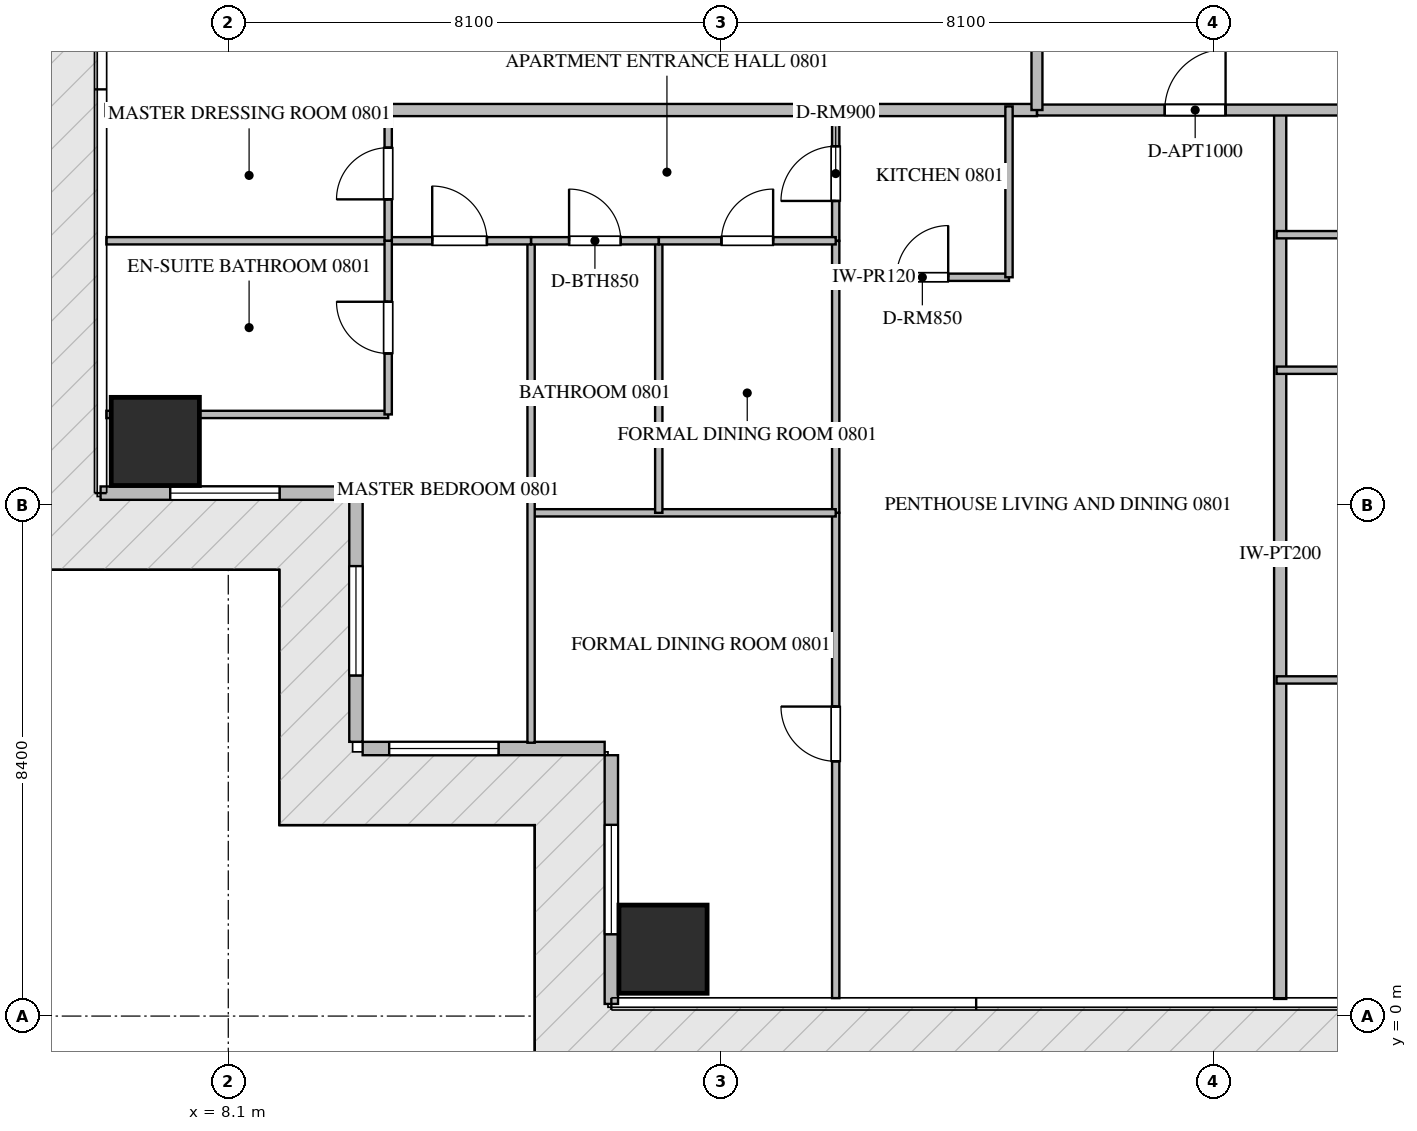
"""IFC4 building model, lengths in metres.
Left out: names, types, materials, properties, quantities, classifications, styles, units other than length and angle.
Written with IfcOpenShell. Run it as: python <this file> out.ifc"""

import sys

from ifc_helpers import new_model, si_unit, direction, frame, frame_2d, origin, origin_2d, place, context, subcontext, project, spatial, rectangle, extrude, source, transform, mapped, element, fill, save


model = new_model("IFC4")
c1 = context("Model", 3, precision=1e-05, world=origin(), true_north=direction((0.0, 1.0)))
c2 = subcontext(c1, "Body", "Model", "MODEL_VIEW")
j1 = project(units=[si_unit("LENGTHUNIT", "METRE"), si_unit("PLANEANGLEUNIT", "RADIAN")], contexts=[c1])
p1 = place(None, origin())
s1 = spatial("IfcSite", under=j1, at=p1, CompositionType="ELEMENT")
p2 = place(p1, origin())
s2 = spatial("IfcBuilding", under=s1, at=p2, CompositionType="ELEMENT")
p3 = place(p2, frame((0.0, 0.0, 37.95)))
s3 = spatial("IfcBuildingStorey", under=s2, at=p3, CompositionType="ELEMENT", Elevation=37.95)
m1 = source(origin(), c2, "Body", "SweptSolid", [
    extrude(rectangle(XDim=1.45, YDim=1.45, at=origin_2d()), origin(), (0.0, 0.0, 1.0), 3.75),
])
for number, where, z_axis, x_axis in (
    (1, (15.25, 1.1, -0.26), (0.0, 0.0, 1.0), (1.0, 0.0, 0.0)),
    (2, (6.9, 9.45, -0.26), (0.0, 0.0, 1.0), (1.0, 0.0, 0.0)),
):
    element("IfcColumn", number, at=place(p3, frame(where, z_axis=z_axis, x_axis=x_axis)), inside=s3, PredefinedType="COLUMN", context=c2, shape_type="MappedRepresentation", body=[
        mapped(m1, transform((0.0, 0.0, 0.0), scale=1.0)),
    ])
p4 = place(p3, frame((6.0, 8.6, 0.0), z_axis=(0.0, 0.0, 1.0), x_axis=(1.0, 0.0, 0.0)))
e3 = element("IfcWall", 3, at=p4, inside=s3, PredefinedType="ELEMENTEDWALL", context=c2, shape_type="SweptSolid", body=[
    extrude(rectangle(XDim=4.09, YDim=0.22, at=frame_2d((2.045, 0.0))), origin(), (0.0, 0.0, 1.0), 3.475),
])
p5 = place(p4, frame((1.145, 0.0, 0.65)))
e4 = element("IfcOpeningElement", 4, at=p5, cuts=e3, PredefinedType="OPENING", context=c2, shape_type="SweptSolid", body=[
    extrude(rectangle(XDim=1.8, YDim=2.1, at=frame_2d((0.9, 1.05))), frame((0.0, 0.12, 0.0), z_axis=(0.0, -1.0, 0.0), x_axis=(1.0, 0.0, 0.0)), (0.0, 0.0, 1.0), 0.24),
])
p6 = place(p3, frame((10.2, 8.49, 0.0), z_axis=(0.0, 0.0, 1.0), x_axis=(0.0, -1.0, 0.0)))
e5 = element("IfcWall", 5, at=p6, inside=s3, PredefinedType="ELEMENTEDWALL", context=c2, shape_type="SweptSolid", body=[
    extrude(rectangle(XDim=3.98, YDim=0.22, at=frame_2d((1.99, 0.0))), origin(), (0.0, 0.0, 1.0), 3.475),
])
p7 = place(p6, frame((1.09, 0.0, 0.65)))
e6 = element("IfcOpeningElement", 6, at=p7, cuts=e5, PredefinedType="OPENING", context=c2, shape_type="SweptSolid", body=[
    extrude(rectangle(XDim=1.8, YDim=2.1, at=frame_2d((0.9, 1.05))), frame((0.0, 0.12, 0.0), z_axis=(0.0, -1.0, 0.0), x_axis=(1.0, 0.0, 0.0)), (0.0, 0.0, 1.0), 0.24),
])
p8 = place(p3, frame((10.31, 4.4, 0.0), z_axis=(0.0, 0.0, 1.0), x_axis=(1.0, 0.0, 0.0)))
e7 = element("IfcWall", 7, at=p8, inside=s3, PredefinedType="ELEMENTEDWALL", context=c2, shape_type="SweptSolid", body=[
    extrude(rectangle(XDim=3.98, YDim=0.22, at=frame_2d((1.99, 0.0))), origin(), (0.0, 0.0, 1.0), 3.475),
])
p9 = place(p8, frame((0.436, 0.0, 0.65)))
e8 = element("IfcOpeningElement", 8, at=p9, cuts=e7, PredefinedType="OPENING", context=c2, shape_type="SweptSolid", body=[
    extrude(rectangle(XDim=1.8, YDim=2.1, at=frame_2d((0.9, 1.05))), frame((0.0, 0.12, 0.0), z_axis=(0.0, -1.0, 0.0), x_axis=(1.0, 0.0, 0.0)), (0.0, 0.0, 1.0), 0.24),
])
p10 = place(p3, frame((14.4, 4.29, 0.0), z_axis=(0.0, 0.0, 1.0), x_axis=(0.0, -1.0, 0.0)))
e9 = element("IfcWall", 9, at=p10, inside=s3, PredefinedType="ELEMENTEDWALL", context=c2, shape_type="SweptSolid", body=[
    extrude(rectangle(XDim=4.09, YDim=0.22, at=frame_2d((2.045, 0.0))), origin(), (0.0, 0.0, 1.0), 3.475),
])
p11 = place(p10, frame((1.145, 0.0, 0.65)))
e10 = element("IfcOpeningElement", 10, at=p11, cuts=e9, PredefinedType="OPENING", context=c2, shape_type="SweptSolid", body=[
    extrude(rectangle(XDim=1.8, YDim=2.1, at=frame_2d((0.9, 1.05))), frame((0.0, 0.12, 0.0), z_axis=(0.0, -1.0, 0.0), x_axis=(1.0, 0.0, 0.0)), (0.0, 0.0, 1.0), 0.24),
])
p12 = place(p3, frame((25.4, 0.282, 0.0), z_axis=(0.0, 0.0, 1.0), x_axis=(0.0, 1.0, 0.0)))
e11 = element("IfcWall", 11, at=p12, inside=s3, PredefinedType="PARTITIONING", context=c2, shape_type="SweptSolid", body=[
    extrude(rectangle(XDim=14.618, YDim=0.2, at=frame_2d((7.309, 0.0))), origin(), (0.0, 0.0, 1.0), 3.49),
])
p13 = place(p3, frame((6.082, 14.9, 0.0), z_axis=(0.0, 0.0, 1.0), x_axis=(1.0, 0.0, 0.0)))
e12 = element("IfcWall", 12, at=p13, inside=s3, PredefinedType="PARTITIONING", context=c2, shape_type="SweptSolid", body=[
    extrude(rectangle(XDim=15.318, YDim=0.2, at=frame_2d((7.659, 0.0))), origin(), (0.0, 0.0, 1.0), 3.49),
])
p14 = place(p3, frame((21.402, 14.9, 0.0), z_axis=(0.0, 0.0, 1.0), x_axis=(1.0, 0.0, 0.0)))
e13 = element("IfcWall", 13, at=p14, inside=s3, PredefinedType="PARTITIONING", context=c2, shape_type="SweptSolid", body=[
    extrude(rectangle(XDim=21.996, YDim=0.18, at=frame_2d((10.998, 0.0))), origin(), (0.0, 0.0, 1.0), 3.49),
])
p15 = place(p14, frame((2.1, 0.0, 0.0)))
e14 = element("IfcOpeningElement", 14, at=p15, cuts=e13, PredefinedType="OPENING", context=c2, shape_type="SweptSolid", body=[
    extrude(rectangle(XDim=1.0, YDim=2.15, at=frame_2d((0.5, 1.075))), frame((0.0, 0.1, 0.0), z_axis=(0.0, -1.0, 0.0), x_axis=(1.0, 0.0, 0.0)), (0.0, 0.0, 1.0), 0.2),
])
p16 = place(p14, frame((14.109, 0.0, 0.0)))
e15 = element("IfcOpeningElement", 15, at=p16, cuts=e13, PredefinedType="OPENING", context=c2, shape_type="SweptSolid", body=[
    extrude(rectangle(XDim=1.0, YDim=2.15, at=frame_2d((0.5, 1.075))), frame((0.0, 0.1, 0.0), z_axis=(0.0, -1.0, 0.0), x_axis=(1.0, 0.0, 0.0)), (0.0, 0.0, 1.0), 0.2),
])
p17 = place(p14, frame((18.896, 0.0, 0.0)))
e16 = element("IfcOpeningElement", 16, at=p17, cuts=e13, PredefinedType="OPENING", context=c2, shape_type="SweptSolid", body=[
    extrude(rectangle(XDim=1.0, YDim=2.15, at=frame_2d((0.5, 1.075))), frame((0.0, 0.1, 0.0), z_axis=(0.0, -1.0, 0.0), x_axis=(1.0, 0.0, 0.0)), (0.0, 0.0, 1.0), 0.2),
])
p18 = place(p3, frame((21.4, 14.9, 0.0), z_axis=(0.0, 0.0, 1.0), x_axis=(0.0, 1.0, 0.0)))
e17 = element("IfcWall", 17, at=p18, inside=s3, PredefinedType="PARTITIONING", context=c2, shape_type="SweptSolid", body=[
    extrude(rectangle(XDim=20.6, YDim=0.18, at=frame_2d((10.3, 0.0))), origin(), (0.0, 0.0, 1.0), 3.49),
])
p19 = place(p18, frame((1.96, 0.0, 0.0)))
e18 = element("IfcOpeningElement", 18, at=p19, cuts=e17, PredefinedType="OPENING", context=c2, shape_type="SweptSolid", body=[
    extrude(rectangle(XDim=1.0, YDim=2.15, at=frame_2d((0.5, 1.075))), frame((0.0, 0.1, 0.0), z_axis=(0.0, -1.0, 0.0), x_axis=(1.0, 0.0, 0.0)), (0.0, 0.0, 1.0), 0.2),
])
p20 = place(p18, frame((13.583, 0.0, 0.0)))
e19 = element("IfcOpeningElement", 19, at=p20, cuts=e17, PredefinedType="OPENING", context=c2, shape_type="SweptSolid", body=[
    extrude(rectangle(XDim=1.0, YDim=2.15, at=frame_2d((0.5, 1.075))), frame((0.0, 0.1, 0.0), z_axis=(0.0, -1.0, 0.0), x_axis=(1.0, 0.0, 0.0)), (0.0, 0.0, 1.0), 0.2),
])
p21 = place(p3, frame((18.09, 12.15, 0.0), z_axis=(0.0, 0.0, 1.0), x_axis=(1.0, 0.0, 0.0)))
e20 = element("IfcWall", 20, at=p21, inside=s3, PredefinedType="PARTITIONING", context=c2, shape_type="SweptSolid", body=[
    extrude(rectangle(XDim=2.85, YDim=0.12, at=frame_2d((1.425, 0.0))), origin(), (0.0, 0.0, 1.0), 3.49),
])
p22 = place(p21, frame((1.0, 0.0, 0.0)))
e21 = element("IfcOpeningElement", 21, at=p22, cuts=e20, PredefinedType="OPENING", context=c2, shape_type="SweptSolid", body=[
    extrude(rectangle(XDim=0.85, YDim=2.1, at=frame_2d((0.425, 1.05))), frame((0.0, 0.07, 0.0), z_axis=(0.0, -1.0, 0.0), x_axis=(1.0, 0.0, 0.0)), (0.0, 0.0, 1.0), 0.14),
])
p23 = place(p3, frame((20.94, 12.15, 0.0), z_axis=(0.0, 0.0, 1.0), x_axis=(0.0, 1.0, 0.0)))
e22 = element("IfcWall", 22, at=p23, inside=s3, PredefinedType="PARTITIONING", context=c2, shape_type="SweptSolid", body=[
    extrude(rectangle(XDim=2.81, YDim=0.12, at=frame_2d((1.405, 0.0))), origin(), (0.0, 0.0, 1.0), 3.49),
])
p24 = place(p3, frame((18.09, 12.75, 0.0), z_axis=(0.0, 0.0, 1.0), x_axis=(0.0, 1.0, 0.0)))
e23 = element("IfcWall", 23, at=p24, inside=s3, PredefinedType="PARTITIONING", context=c2, shape_type="SweptSolid", body=[
    extrude(rectangle(XDim=2.21, YDim=0.12, at=frame_2d((1.105, 0.0))), origin(), (0.0, 0.0, 1.0), 3.49),
])
p25 = place(p24, frame((0.655, 0.0, 0.0)))
e24 = element("IfcOpeningElement", 24, at=p25, cuts=e23, PredefinedType="OPENING", context=c2, shape_type="SweptSolid", body=[
    extrude(rectangle(XDim=0.9, YDim=2.1, at=frame_2d((0.45, 1.05))), frame((0.0, 0.07, 0.0), z_axis=(0.0, -1.0, 0.0), x_axis=(1.0, 0.0, 0.0)), (0.0, 0.0, 1.0), 0.14),
])
p26 = place(p3, frame((18.09, 0.295, 0.0), z_axis=(0.0, 0.0, 1.0), x_axis=(0.0, 1.0, 0.0)))
e25 = element("IfcWall", 25, at=p26, inside=s3, PredefinedType="PARTITIONING", context=c2, shape_type="SweptSolid", body=[
    extrude(rectangle(XDim=7.981, YDim=0.12, at=frame_2d((3.99, 0.0))), origin(), (0.0, 0.0, 1.0), 3.49),
])
p27 = place(p26, frame((3.895, 0.0, 0.0)))
e26 = element("IfcOpeningElement", 26, at=p27, cuts=e25, PredefinedType="OPENING", context=c2, shape_type="SweptSolid", body=[
    extrude(rectangle(XDim=0.9, YDim=2.1, at=frame_2d((0.45, 1.05))), frame((0.0, 0.07, 0.0), z_axis=(0.0, -1.0, 0.0), x_axis=(1.0, 0.0, 0.0)), (0.0, 0.0, 1.0), 0.14),
])
p28 = place(p3, frame((18.09, 8.278, 0.0), z_axis=(0.0, 0.0, 1.0), x_axis=(0.0, 1.0, 0.0)))
e27 = element("IfcWall", 27, at=p28, inside=s3, PredefinedType="PARTITIONING", context=c2, shape_type="SweptSolid", body=[
    extrude(rectangle(XDim=4.47, YDim=0.12, at=frame_2d((2.235, 0.0))), origin(), (0.0, 0.0, 1.0), 3.49),
])
p29 = place(p3, frame((13.08, 8.276, 0.0), z_axis=(0.0, 0.0, 1.0), x_axis=(1.0, 0.0, 0.0)))
e28 = element("IfcWall", 28, at=p29, inside=s3, PredefinedType="PARTITIONING", context=c2, shape_type="SweptSolid", body=[
    extrude(rectangle(XDim=5.01, YDim=0.12, at=frame_2d((2.505, 0.0))), origin(), (0.0, 0.0, 1.0), 3.49),
])
p30 = place(p3, frame((13.08, 4.495, 0.0), z_axis=(0.0, 0.0, 1.0), x_axis=(0.0, 1.0, 0.0)))
e29 = element("IfcWall", 29, at=p30, inside=s3, PredefinedType="PARTITIONING", context=c2, shape_type="SweptSolid", body=[
    extrude(rectangle(XDim=8.255, YDim=0.12, at=frame_2d((4.127, 0.0))), origin(), (0.0, 0.0, 1.0), 3.49),
])
p31 = place(p3, frame((15.18, 8.276, 0.0), z_axis=(0.0, 0.0, 1.0), x_axis=(0.0, 1.0, 0.0)))
e30 = element("IfcWall", 30, at=p31, inside=s3, PredefinedType="PARTITIONING", context=c2, shape_type="SweptSolid", body=[
    extrude(rectangle(XDim=4.474, YDim=0.12, at=frame_2d((2.237, 0.0))), origin(), (0.0, 0.0, 1.0), 2.922),
])
p32 = place(p3, frame((13.08, 12.75, 0.0), z_axis=(0.0, 0.0, 1.0), x_axis=(1.0, 0.0, 0.0)))
e31 = element("IfcWall", 31, at=p32, inside=s3, PredefinedType="PARTITIONING", context=c2, shape_type="SweptSolid", body=[
    extrude(rectangle(XDim=2.1, YDim=0.12, at=frame_2d((1.05, 0.0))), origin(), (0.0, 0.0, 1.0), 3.49),
])
p33 = place(p32, frame((0.625, 0.0, 0.0)))
e32 = element("IfcOpeningElement", 32, at=p33, cuts=e31, PredefinedType="OPENING", context=c2, shape_type="SweptSolid", body=[
    extrude(rectangle(XDim=0.85, YDim=2.1, at=frame_2d((0.425, 1.05))), frame((0.0, 0.07, 0.0), z_axis=(0.0, -1.0, 0.0), x_axis=(1.0, 0.0, 0.0)), (0.0, 0.0, 1.0), 0.14),
])
p34 = place(p3, frame((15.182, 12.75, 0.0), z_axis=(0.0, 0.0, 1.0), x_axis=(1.0, 0.0, 0.0)))
e33 = element("IfcWall", 33, at=p34, inside=s3, PredefinedType="PARTITIONING", context=c2, shape_type="SweptSolid", body=[
    extrude(rectangle(XDim=2.908, YDim=0.12, at=frame_2d((1.454, 0.0))), origin(), (0.0, 0.0, 1.0), 3.49),
])
p35 = place(p34, frame((1.029, 0.0, 0.0)))
e34 = element("IfcOpeningElement", 34, at=p35, cuts=e33, PredefinedType="OPENING", context=c2, shape_type="SweptSolid", body=[
    extrude(rectangle(XDim=0.85, YDim=2.1, at=frame_2d((0.425, 1.05))), frame((0.0, 0.07, 0.0), z_axis=(0.0, -1.0, 0.0), x_axis=(1.0, 0.0, 0.0)), (0.0, 0.0, 1.0), 0.14),
])
p36 = place(p3, frame((10.73, 12.75, 0.0), z_axis=(0.0, 0.0, 1.0), x_axis=(1.0, 0.0, 0.0)))
e35 = element("IfcWall", 35, at=p36, inside=s3, PredefinedType="PARTITIONING", context=c2, shape_type="SweptSolid", body=[
    extrude(rectangle(XDim=2.348, YDim=0.12, at=frame_2d((1.174, 0.0))), origin(), (0.0, 0.0, 1.0), 3.49),
])
p37 = place(p36, frame((0.724, 0.0, 0.0)))
e36 = element("IfcOpeningElement", 36, at=p37, cuts=e35, PredefinedType="OPENING", context=c2, shape_type="SweptSolid", body=[
    extrude(rectangle(XDim=0.9, YDim=2.1, at=frame_2d((0.45, 1.05))), frame((0.0, 0.07, 0.0), z_axis=(0.0, -1.0, 0.0), x_axis=(1.0, 0.0, 0.0)), (0.0, 0.0, 1.0), 0.14),
])
p38 = place(p3, frame((6.095, 9.894, 0.0), z_axis=(0.0, 0.0, 1.0), x_axis=(1.0, 0.0, 0.0)))
e37 = element("IfcWall", 37, at=p38, inside=s3, PredefinedType="PARTITIONING", context=c2, shape_type="SweptSolid", body=[
    extrude(rectangle(XDim=4.635, YDim=0.12, at=frame_2d((2.317, 0.0))), origin(), (0.0, 0.0, 1.0), 3.49),
])
p39 = place(p3, frame((6.095, 12.75, 0.0), z_axis=(0.0, 0.0, 1.0), x_axis=(1.0, 0.0, 0.0)))
e38 = element("IfcWall", 38, at=p39, inside=s3, PredefinedType="PARTITIONING", context=c2, shape_type="SweptSolid", body=[
    extrude(rectangle(XDim=4.633, YDim=0.12, at=frame_2d((2.316, 0.0))), origin(), (0.0, 0.0, 1.0), 3.49),
])
p40 = place(p3, frame((10.73, 9.894, 0.0), z_axis=(0.0, 0.0, 1.0), x_axis=(0.0, 1.0, 0.0)))
e39 = element("IfcWall", 39, at=p40, inside=s3, PredefinedType="PARTITIONING", context=c2, shape_type="SweptSolid", body=[
    extrude(rectangle(XDim=2.856, YDim=0.12, at=frame_2d((1.428, 0.0))), origin(), (0.0, 0.0, 1.0), 3.49),
])
p41 = place(p40, frame((1.003, 0.0, 0.0)))
e40 = element("IfcOpeningElement", 40, at=p41, cuts=e39, PredefinedType="OPENING", context=c2, shape_type="SweptSolid", body=[
    extrude(rectangle(XDim=0.85, YDim=2.1, at=frame_2d((0.425, 1.05))), frame((0.0, 0.07, 0.0), z_axis=(0.0, -1.0, 0.0), x_axis=(1.0, 0.0, 0.0)), (0.0, 0.0, 1.0), 0.14),
])
p42 = place(p3, frame((10.73, 12.752, 0.0), z_axis=(0.0, 0.0, 1.0), x_axis=(0.0, 1.0, 0.0)))
e41 = element("IfcWall", 41, at=p42, inside=s3, PredefinedType="PARTITIONING", context=c2, shape_type="SweptSolid", body=[
    extrude(rectangle(XDim=2.208, YDim=0.12, at=frame_2d((1.104, 0.0))), origin(), (0.0, 0.0, 1.0), 3.49),
])
p43 = place(p42, frame((0.679, 0.0, 0.0)))
e42 = element("IfcOpeningElement", 42, at=p43, cuts=e41, PredefinedType="OPENING", context=c2, shape_type="SweptSolid", body=[
    extrude(rectangle(XDim=0.85, YDim=2.1, at=frame_2d((0.425, 1.05))), frame((0.0, 0.07, 0.0), z_axis=(0.0, -1.0, 0.0), x_axis=(1.0, 0.0, 0.0)), (0.0, 0.0, 1.0), 0.14),
])
for number, where, z_axis, x_axis in (
    (43, (25.34, 5.528, 0.0), (0.0, 0.0, 1.0), (1.0, 0.0, 0.0)),
    (44, (25.34, 10.621, 0.0), (0.0, 0.0, 1.0), (1.0, 0.0, 0.0)),
    (45, (25.34, 12.85, 0.0), (0.0, 0.0, 1.0), (1.0, 0.0, 0.0)),
):
    element("IfcWall", number, at=place(p3, frame(where, z_axis=z_axis, x_axis=x_axis)), inside=s3, PredefinedType="PARTITIONING", context=c2, shape_type="SweptSolid", body=[
        extrude(rectangle(XDim=8.18, YDim=0.12, at=frame_2d((4.09, 0.0))), origin(), (0.0, 0.0, 1.0), 3.49),
    ])
m2 = source(origin(), c2, "Body", "SweptSolid", [
    extrude(rectangle(XDim=1.8, YDim=2.1, at=frame_2d((0.9, 1.05))), frame((0.0, 0.03, 0.0), z_axis=(0.0, -1.0, 0.0), x_axis=(1.0, 0.0, 0.0)), (0.0, 0.0, 1.0), 0.06),
])
p44 = place(p5, origin())
e46 = element("IfcWindow", 46, at=p44, inside=s3, PartitioningType="SINGLE_PANEL", PredefinedType="WINDOW", context=c2, shape_type="MappedRepresentation", body=[
    mapped(m2, transform((0.0, 0.0, 0.0), scale=1.0)),
])
fill(e4, e46)
p45 = place(p7, origin())
e47 = element("IfcWindow", 47, at=p45, inside=s3, PartitioningType="SINGLE_PANEL", PredefinedType="WINDOW", context=c2, shape_type="MappedRepresentation", body=[
    mapped(m2, transform((0.0, 0.0, 0.0), scale=1.0)),
])
fill(e6, e47)
p46 = place(p9, origin())
e48 = element("IfcWindow", 48, at=p46, inside=s3, PartitioningType="SINGLE_PANEL", PredefinedType="WINDOW", context=c2, shape_type="MappedRepresentation", body=[
    mapped(m2, transform((0.0, 0.0, 0.0), scale=1.0)),
])
fill(e8, e48)
p47 = place(p11, origin())
e49 = element("IfcWindow", 49, at=p47, inside=s3, PartitioningType="SINGLE_PANEL", PredefinedType="WINDOW", context=c2, shape_type="MappedRepresentation", body=[
    mapped(m2, transform((0.0, 0.0, 0.0), scale=1.0)),
])
fill(e10, e49)
m3 = source(origin(), c2, "Body", "SweptSolid", [
    extrude(rectangle(XDim=1.0, YDim=2.15, at=frame_2d((0.5, 1.075))), frame((0.0, 0.025, 0.0), z_axis=(0.0, -1.0, 0.0), x_axis=(1.0, 0.0, 0.0)), (0.0, 0.0, 1.0), 0.05),
])
p48 = place(p15, origin())
e50 = element("IfcDoor", 50, at=p48, inside=s3, OperationType="SINGLE_SWING_RIGHT", PredefinedType="DOOR", context=c2, shape_type="MappedRepresentation", body=[
    mapped(m3, transform((0.0, 0.0, 0.0), scale=1.0)),
])
fill(e14, e50)
m4 = source(origin(), c2, "Body", "SweptSolid", [
    extrude(rectangle(XDim=0.85, YDim=2.1, at=frame_2d((0.425, 1.05))), frame((0.0, 0.025, 0.0), z_axis=(0.0, -1.0, 0.0), x_axis=(1.0, 0.0, 0.0)), (0.0, 0.0, 1.0), 0.05),
])
p49 = place(p22, origin())
e51 = element("IfcDoor", 51, at=p49, inside=s3, OperationType="SINGLE_SWING_RIGHT", PredefinedType="DOOR", context=c2, shape_type="MappedRepresentation", body=[
    mapped(m4, transform((0.0, 0.0, 0.0), scale=1.0)),
])
fill(e21, e51)
m5 = source(origin(), c2, "Body", "SweptSolid", [
    extrude(rectangle(XDim=0.9, YDim=2.1, at=frame_2d((0.45, 1.05))), frame((0.0, 0.025, 0.0), z_axis=(0.0, -1.0, 0.0), x_axis=(1.0, 0.0, 0.0)), (0.0, 0.0, 1.0), 0.05),
])
p50 = place(p25, origin())
e52 = element("IfcDoor", 52, at=p50, inside=s3, OperationType="SINGLE_SWING_LEFT", PredefinedType="DOOR", context=c2, shape_type="MappedRepresentation", body=[
    mapped(m5, transform((0.0, 0.0, 0.0), scale=1.0)),
])
fill(e24, e52)
p51 = place(p27, origin())
e53 = element("IfcDoor", 53, at=p51, inside=s3, OperationType="SINGLE_SWING_RIGHT", PredefinedType="DOOR", context=c2, shape_type="MappedRepresentation", body=[
    mapped(m5, transform((0.0, 0.0, 0.0), scale=1.0)),
])
fill(e26, e53)
p52 = place(p33, origin())
e54 = element("IfcDoor", 54, at=p52, inside=s3, OperationType="SINGLE_SWING_LEFT", PredefinedType="DOOR", context=c2, shape_type="MappedRepresentation", body=[
    mapped(m4, transform((0.0, 0.0, 0.0), scale=1.0)),
])
fill(e32, e54)
p53 = place(p35, origin())
e55 = element("IfcDoor", 55, at=p53, inside=s3, OperationType="SINGLE_SWING_RIGHT", PredefinedType="DOOR", context=c2, shape_type="MappedRepresentation", body=[
    mapped(m4, transform((0.0, 0.0, 0.0), scale=1.0)),
])
fill(e34, e55)
p54 = place(p37, origin())
e56 = element("IfcDoor", 56, at=p54, inside=s3, OperationType="SINGLE_SWING_LEFT", PredefinedType="DOOR", context=c2, shape_type="MappedRepresentation", body=[
    mapped(m5, transform((0.0, 0.0, 0.0), scale=1.0)),
])
fill(e36, e56)
p55 = place(p41, origin())
e57 = element("IfcDoor", 57, at=p55, inside=s3, OperationType="SINGLE_SWING_RIGHT", PredefinedType="DOOR", context=c2, shape_type="MappedRepresentation", body=[
    mapped(m4, transform((0.0, 0.0, 0.0), scale=1.0)),
])
fill(e40, e57)
p56 = place(p43, origin())
e58 = element("IfcDoor", 58, at=p56, inside=s3, OperationType="SINGLE_SWING_LEFT", PredefinedType="DOOR", context=c2, shape_type="MappedRepresentation", body=[
    mapped(m4, transform((0.0, 0.0, 0.0), scale=1.0)),
])
fill(e42, e58)
save(model, sys.argv[1])
